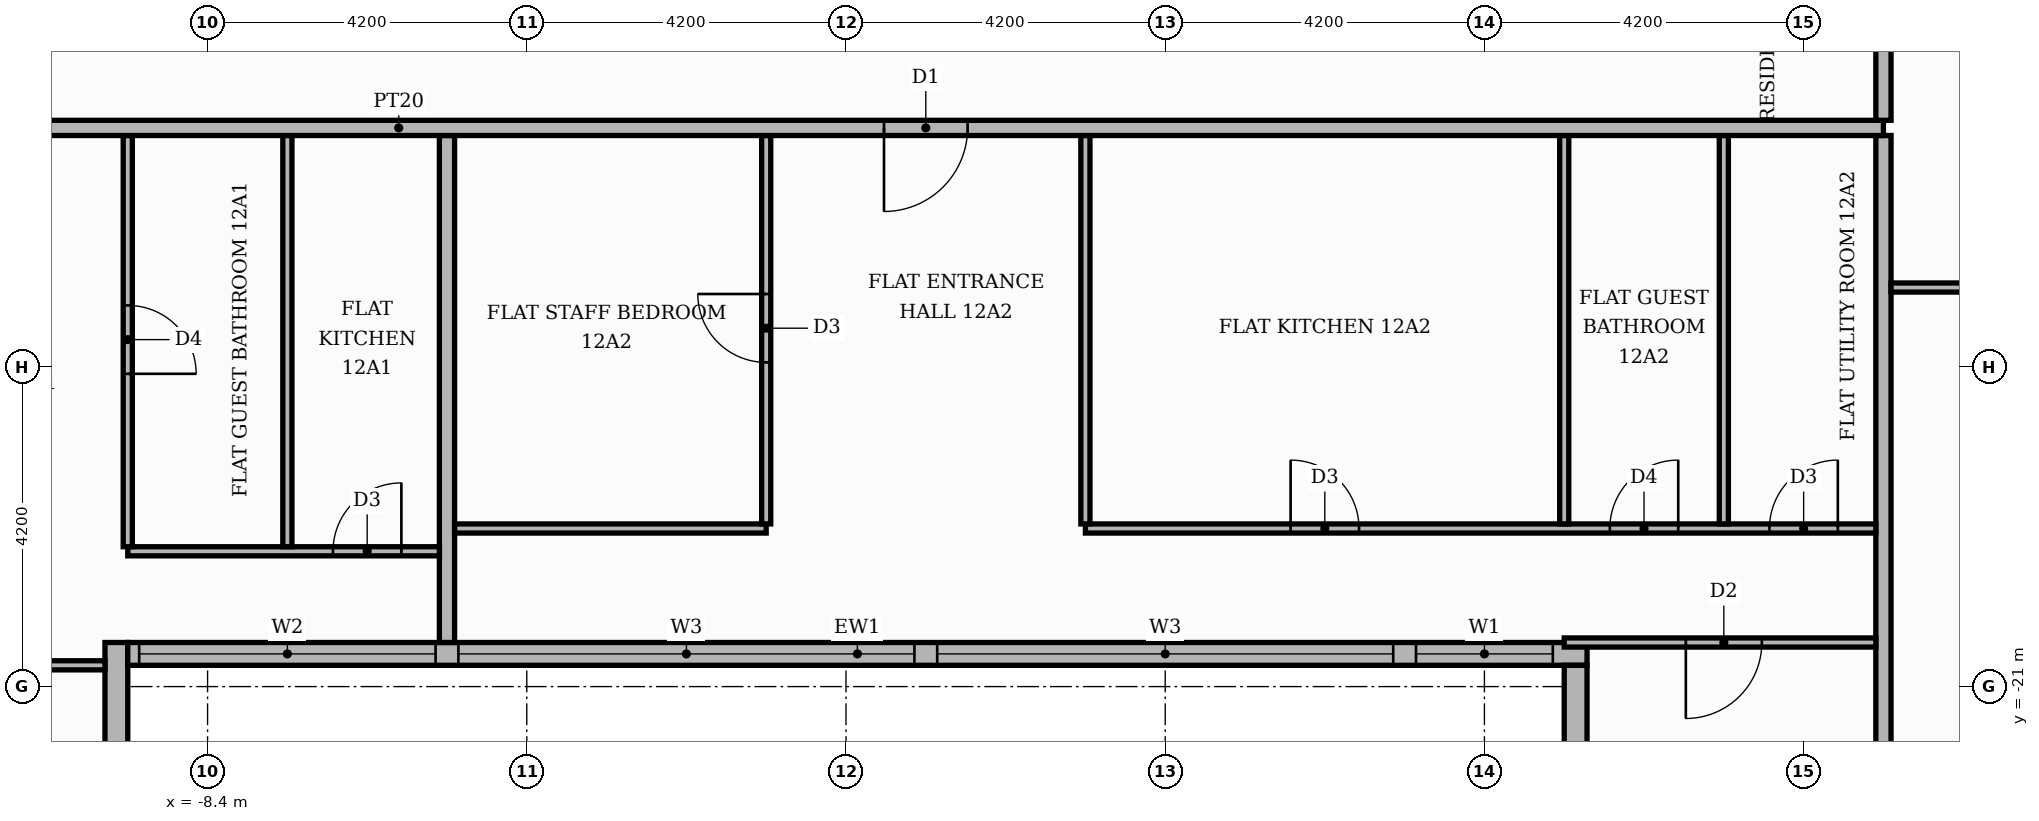
"""IFC4 building model, lengths in metres.
Left out: names, types, materials, properties, quantities, classifications, styles, units other than length and angle.
Written with IfcOpenShell. Run it as: python <this file> out.ifc"""

import sys

from ifc_helpers import new_model, si_unit, direction, frame, frame_2d, origin, place, context, subcontext, project, spatial, rectangle, extrude, element, fill, save


model = new_model("IFC4")
c1 = context("Model", 3, precision=1e-05, world=origin(), true_north=direction((0.0, 1.0)))
c2 = subcontext(c1, "Body", "Model", "MODEL_VIEW")
j1 = project(units=[si_unit("LENGTHUNIT", "METRE"), si_unit("PLANEANGLEUNIT", "RADIAN")], contexts=[c1])
p1 = place(None, origin())
s1 = spatial("IfcSite", under=j1, at=p1, CompositionType="ELEMENT")
p2 = place(p1, origin())
s2 = spatial("IfcBuilding", under=s1, at=p2, CompositionType="ELEMENT")
p3 = place(p2, frame((0.0, 0.0, 54.3)))
s3 = spatial("IfcBuildingStorey", under=s2, at=p3, CompositionType="ELEMENT", Elevation=54.3)
p4 = place(p3, frame((-9.6, -25.42, 0.0), z_axis=(0.0, 0.0, 1.0), x_axis=(0.0, 1.0, 0.0)))
e1 = element("IfcWall", 1, at=p4, inside=s3, PredefinedType="STANDARD", context=c2, shape_type="SweptSolid", body=[
    extrude(rectangle(XDim=5.0, YDim=0.3, at=frame_2d((2.5, 0.0))), origin(), (0.0, 0.0, 1.0), 3.48),
])
p5 = place(p4, frame((1.42, 0.0, 0.9)))
e2 = element("IfcOpeningElement", 2, at=p5, cuts=e1, PredefinedType="OPENING", context=c2, shape_type="SweptSolid", body=[
    extrude(rectangle(XDim=1.8, YDim=2.1, at=frame_2d((0.9, 1.05))), frame((0.0, 0.16, 0.0), z_axis=(0.0, -1.0, 0.0), x_axis=(1.0, 0.0, 0.0)), (0.0, 0.0, 1.0), 0.32),
])
p6 = place(p3, frame((-9.45, -20.57, 0.0), z_axis=(0.0, 0.0, 1.0), x_axis=(1.0, 0.0, 0.0)))
e3 = element("IfcWall", 3, at=p6, inside=s3, PredefinedType="STANDARD", context=c2, shape_type="SweptSolid", body=[
    extrude(rectangle(XDim=19.2, YDim=0.3, at=frame_2d((9.6, 0.0))), origin(), (0.0, 0.0, 1.0), 3.48),
])
p7 = place(p6, frame((0.15, 0.0, 0.9)))
e4 = element("IfcOpeningElement", 4, at=p7, cuts=e3, PredefinedType="OPENING", context=c2, shape_type="SweptSolid", body=[
    extrude(rectangle(XDim=3.9, YDim=2.1, at=frame_2d((1.95, 1.05))), frame((0.0, 0.16, 0.0), z_axis=(0.0, -1.0, 0.0), x_axis=(1.0, 0.0, 0.0)), (0.0, 0.0, 1.0), 0.32),
])
p8 = place(p6, frame((4.35, 0.0, 0.9)))
e5 = element("IfcOpeningElement", 5, at=p8, cuts=e3, PredefinedType="OPENING", context=c2, shape_type="SweptSolid", body=[
    extrude(rectangle(XDim=6.0, YDim=2.1, at=frame_2d((3.0, 1.05))), frame((0.0, 0.16, 0.0), z_axis=(0.0, -1.0, 0.0), x_axis=(1.0, 0.0, 0.0)), (0.0, 0.0, 1.0), 0.32),
])
p9 = place(p6, frame((10.65, 0.0, 0.9)))
e6 = element("IfcOpeningElement", 6, at=p9, cuts=e3, PredefinedType="OPENING", context=c2, shape_type="SweptSolid", body=[
    extrude(rectangle(XDim=6.0, YDim=2.1, at=frame_2d((3.0, 1.05))), frame((0.0, 0.16, 0.0), z_axis=(0.0, -1.0, 0.0), x_axis=(1.0, 0.0, 0.0)), (0.0, 0.0, 1.0), 0.32),
])
p10 = place(p6, frame((16.95, 0.0, 0.9)))
e7 = element("IfcOpeningElement", 7, at=p10, cuts=e3, PredefinedType="OPENING", context=c2, shape_type="SweptSolid", body=[
    extrude(rectangle(XDim=1.8, YDim=2.1, at=frame_2d((0.9, 1.05))), frame((0.0, 0.16, 0.0), z_axis=(0.0, -1.0, 0.0), x_axis=(1.0, 0.0, 0.0)), (0.0, 0.0, 1.0), 0.32),
])
p11 = place(p3, frame((9.6, -20.72, 0.0), z_axis=(0.0, 0.0, 1.0), x_axis=(0.0, -1.0, 0.0)))
e8 = element("IfcWall", 8, at=p11, inside=s3, PredefinedType="STANDARD", context=c2, shape_type="SweptSolid", body=[
    extrude(rectangle(XDim=5.0, YDim=0.3, at=frame_2d((2.5, 0.0))), origin(), (0.0, 0.0, 1.0), 3.48),
])
p12 = place(p11, frame((1.48, 0.0, 0.9)))
e9 = element("IfcOpeningElement", 9, at=p12, cuts=e8, PredefinedType="OPENING", context=c2, shape_type="SweptSolid", body=[
    extrude(rectangle(XDim=1.8, YDim=2.1, at=frame_2d((0.9, 1.05))), frame((0.0, 0.16, 0.0), z_axis=(0.0, -1.0, 0.0), x_axis=(1.0, 0.0, 0.0)), (0.0, 0.0, 1.0), 0.32),
])
p13 = place(p3, frame((13.65, -25.42, 0.0), z_axis=(0.0, 0.0, 1.0), x_axis=(0.0, 1.0, 0.0)))
e10 = element("IfcWall", 10, at=p13, inside=s3, PredefinedType="PARTITIONING", context=c2, shape_type="SweptSolid", body=[
    extrude(rectangle(XDim=11.67, YDim=0.2, at=frame_2d((5.835, 0.0))), origin(), (0.0, 0.0, 1.0), 3.48),
])
p14 = place(p3, frame((-25.42, -20.72, 0.0), z_axis=(0.0, 0.0, 1.0), x_axis=(1.0, 0.0, 0.0)))
e11 = element("IfcWall", 11, at=p14, inside=s3, PredefinedType="PARTITIONING", context=c2, shape_type="SweptSolid", body=[
    extrude(rectangle(XDim=15.67, YDim=0.12, at=frame_2d((7.835, 0.0))), origin(), (0.0, 0.0, 1.0), 3.48),
])
p15 = place(p14, frame((12.32, 0.0, 0.0)))
e12 = element("IfcOpeningElement", 12, at=p15, cuts=e11, PredefinedType="OPENING", context=c2, shape_type="SweptSolid", body=[
    extrude(rectangle(XDim=1.0, YDim=2.1, at=frame_2d((0.5, 1.05))), frame((0.0, 0.07, 0.0), z_axis=(0.0, -1.0, 0.0), x_axis=(1.0, 0.0, 0.0)), (0.0, 0.0, 1.0), 0.14),
])
p16 = place(p3, frame((-5.25, -20.42, 0.0), z_axis=(0.0, 0.0, 1.0), x_axis=(0.0, 1.0, 0.0)))
e13 = element("IfcWall", 13, at=p16, inside=s3, PredefinedType="PARTITIONING", context=c2, shape_type="SweptSolid", body=[
    extrude(rectangle(XDim=6.67, YDim=0.2, at=frame_2d((3.335, 0.0))), origin(), (0.0, 0.0, 1.0), 3.48),
])
p17 = place(p3, frame((9.45, -20.42, 0.0), z_axis=(0.0, 0.0, 1.0), x_axis=(1.0, 0.0, 0.0)))
e14 = element("IfcWall", 14, at=p17, inside=s3, PredefinedType="PARTITIONING", context=c2, shape_type="SweptSolid", body=[
    extrude(rectangle(XDim=4.1, YDim=0.12, at=frame_2d((2.05, 0.0))), origin(), (0.0, 0.0, 1.0), 3.48),
])
p18 = place(p17, frame((1.6, 0.0, 0.0)))
e15 = element("IfcOpeningElement", 15, at=p18, cuts=e14, PredefinedType="OPENING", context=c2, shape_type="SweptSolid", body=[
    extrude(rectangle(XDim=1.0, YDim=2.1, at=frame_2d((0.5, 1.05))), frame((0.0, 0.07, 0.0), z_axis=(0.0, -1.0, 0.0), x_axis=(1.0, 0.0, 0.0)), (0.0, 0.0, 1.0), 0.14),
])
p19 = place(p3, frame((-9.45, -19.22, 0.0), z_axis=(0.0, 0.0, 1.0), x_axis=(1.0, 0.0, 0.0)))
e16 = element("IfcWall", 16, at=p19, inside=s3, PredefinedType="PARTITIONING", context=c2, shape_type="SweptSolid", body=[
    extrude(rectangle(XDim=4.1, YDim=0.12, at=frame_2d((2.05, 0.0))), origin(), (0.0, 0.0, 1.0), 3.48),
])
p20 = place(p19, frame((2.7, 0.0, 0.0)))
e17 = element("IfcOpeningElement", 17, at=p20, cuts=e16, PredefinedType="OPENING", context=c2, shape_type="SweptSolid", body=[
    extrude(rectangle(XDim=0.9, YDim=2.1, at=frame_2d((0.45, 1.05))), frame((0.0, 0.07, 0.0), z_axis=(0.0, -1.0, 0.0), x_axis=(1.0, 0.0, 0.0)), (0.0, 0.0, 1.0), 0.14),
])
p21 = place(p3, frame((-9.45, -19.16, 0.0), z_axis=(0.0, 0.0, 1.0), x_axis=(0.0, 1.0, 0.0)))
e18 = element("IfcWall", 18, at=p21, inside=s3, PredefinedType="PARTITIONING", context=c2, shape_type="SweptSolid", body=[
    extrude(rectangle(XDim=5.41, YDim=0.12, at=frame_2d((2.705, 0.0))), origin(), (0.0, 0.0, 1.0), 3.48),
])
p22 = place(p21, frame((2.275, 0.0, 0.0)))
e19 = element("IfcOpeningElement", 19, at=p22, cuts=e18, PredefinedType="OPENING", context=c2, shape_type="SweptSolid", body=[
    extrude(rectangle(XDim=0.9, YDim=2.1, at=frame_2d((0.45, 1.05))), frame((0.0, 0.07, 0.0), z_axis=(0.0, -1.0, 0.0), x_axis=(1.0, 0.0, 0.0)), (0.0, 0.0, 1.0), 0.14),
])
p23 = place(p3, frame((-7.35, -19.16, 0.0), z_axis=(0.0, 0.0, 1.0), x_axis=(0.0, 1.0, 0.0)))
e20 = element("IfcWall", 20, at=p23, inside=s3, PredefinedType="PARTITIONING", context=c2, shape_type="SweptSolid", body=[
    extrude(rectangle(XDim=5.41, YDim=0.12, at=frame_2d((2.705, 0.0))), origin(), (0.0, 0.0, 1.0), 3.48),
])
p24 = place(p3, frame((-5.15, -18.92, 0.0), z_axis=(0.0, 0.0, 1.0), x_axis=(1.0, 0.0, 0.0)))
e21 = element("IfcWall", 21, at=p24, inside=s3, PredefinedType="PARTITIONING", context=c2, shape_type="SweptSolid", body=[
    extrude(rectangle(XDim=4.1, YDim=0.12, at=frame_2d((2.05, 0.0))), origin(), (0.0, 0.0, 1.0), 3.48),
])
p25 = place(p3, frame((3.15, -18.92, 0.0), z_axis=(0.0, 0.0, 1.0), x_axis=(1.0, 0.0, 0.0)))
e22 = element("IfcWall", 22, at=p25, inside=s3, PredefinedType="PARTITIONING", context=c2, shape_type="SweptSolid", body=[
    extrude(rectangle(XDim=10.4, YDim=0.12, at=frame_2d((5.2, 0.0))), origin(), (0.0, 0.0, 1.0), 3.48),
])
p26 = place(p25, frame((2.7, 0.0, 0.0)))
e23 = element("IfcOpeningElement", 23, at=p26, cuts=e22, PredefinedType="OPENING", context=c2, shape_type="SweptSolid", body=[
    extrude(rectangle(XDim=0.9, YDim=2.1, at=frame_2d((0.45, 1.05))), frame((0.0, 0.07, 0.0), z_axis=(0.0, -1.0, 0.0), x_axis=(1.0, 0.0, 0.0)), (0.0, 0.0, 1.0), 0.14),
])
p27 = place(p25, frame((6.9, 0.0, 0.0)))
e24 = element("IfcOpeningElement", 24, at=p27, cuts=e22, PredefinedType="OPENING", context=c2, shape_type="SweptSolid", body=[
    extrude(rectangle(XDim=0.9, YDim=2.1, at=frame_2d((0.45, 1.05))), frame((0.0, 0.07, 0.0), z_axis=(0.0, -1.0, 0.0), x_axis=(1.0, 0.0, 0.0)), (0.0, 0.0, 1.0), 0.14),
])
p28 = place(p25, frame((9.0, 0.0, 0.0)))
e25 = element("IfcOpeningElement", 25, at=p28, cuts=e22, PredefinedType="OPENING", context=c2, shape_type="SweptSolid", body=[
    extrude(rectangle(XDim=0.9, YDim=2.1, at=frame_2d((0.45, 1.05))), frame((0.0, 0.07, 0.0), z_axis=(0.0, -1.0, 0.0), x_axis=(1.0, 0.0, 0.0)), (0.0, 0.0, 1.0), 0.14),
])
p29 = place(p3, frame((-1.05, -18.86, 0.0), z_axis=(0.0, 0.0, 1.0), x_axis=(0.0, 1.0, 0.0)))
e26 = element("IfcWall", 26, at=p29, inside=s3, PredefinedType="PARTITIONING", context=c2, shape_type="SweptSolid", body=[
    extrude(rectangle(XDim=5.11, YDim=0.12, at=frame_2d((2.555, 0.0))), origin(), (0.0, 0.0, 1.0), 3.48),
])
p30 = place(p29, frame((2.125, 0.0, 0.0)))
e27 = element("IfcOpeningElement", 27, at=p30, cuts=e26, PredefinedType="OPENING", context=c2, shape_type="SweptSolid", body=[
    extrude(rectangle(XDim=0.9, YDim=2.1, at=frame_2d((0.45, 1.05))), frame((0.0, 0.07, 0.0), z_axis=(0.0, -1.0, 0.0), x_axis=(1.0, 0.0, 0.0)), (0.0, 0.0, 1.0), 0.14),
])
for number, where, z_axis, x_axis in (
    (28, (3.15, -18.86, 0.0), (0.0, 0.0, 1.0), (0.0, 1.0, 0.0)),
    (29, (9.45, -18.86, 0.0), (0.0, 0.0, 1.0), (0.0, 1.0, 0.0)),
    (30, (11.55, -18.86, 0.0), (0.0, 0.0, 1.0), (0.0, 1.0, 0.0)),
):
    element("IfcWall", number, at=place(p3, frame(where, z_axis=z_axis, x_axis=x_axis)), inside=s3, PredefinedType="PARTITIONING", context=c2, shape_type="SweptSolid", body=[
        extrude(rectangle(XDim=5.11, YDim=0.12, at=frame_2d((2.555, 0.0))), origin(), (0.0, 0.0, 1.0), 3.48),
    ])
p31 = place(p3, frame((13.75, -15.75, 0.0), z_axis=(0.0, 0.0, 1.0), x_axis=(1.0, 0.0, 0.0)))
e31 = element("IfcWall", 31, at=p31, inside=s3, PredefinedType="PARTITIONING", context=c2, shape_type="SweptSolid", body=[
    extrude(rectangle(XDim=6.67, YDim=0.12, at=frame_2d((3.335, 0.0))), origin(), (0.0, 0.0, 1.0), 3.48),
])
p32 = place(p31, frame((2.785, 0.0, 0.0)))
e32 = element("IfcOpeningElement", 32, at=p32, cuts=e31, PredefinedType="OPENING", context=c2, shape_type="SweptSolid", body=[
    extrude(rectangle(XDim=1.0, YDim=2.1, at=frame_2d((0.5, 1.05))), frame((0.0, 0.07, 0.0), z_axis=(0.0, -1.0, 0.0), x_axis=(1.0, 0.0, 0.0)), (0.0, 0.0, 1.0), 0.14),
])
p33 = place(p3, frame((-25.42, -13.65, 0.0), z_axis=(0.0, 0.0, 1.0), x_axis=(1.0, 0.0, 0.0)))
e33 = element("IfcWall", 33, at=p33, inside=s3, PredefinedType="PARTITIONING", context=c2, shape_type="SweptSolid", body=[
    extrude(rectangle(XDim=39.07, YDim=0.2, at=frame_2d((19.535, 0.0))), origin(), (0.0, 0.0, 1.0), 3.48),
])
p34 = place(p33, frame((13.32, 0.0, 0.0)))
e34 = element("IfcOpeningElement", 34, at=p34, cuts=e33, PredefinedType="OPENING", context=c2, shape_type="SweptSolid", body=[
    extrude(rectangle(XDim=1.1, YDim=2.4, at=frame_2d((0.55, 1.2))), frame((0.0, 0.11, 0.0), z_axis=(0.0, -1.0, 0.0), x_axis=(1.0, 0.0, 0.0)), (0.0, 0.0, 1.0), 0.22),
])
p35 = place(p33, frame((25.92, 0.0, 0.0)))
e35 = element("IfcOpeningElement", 35, at=p35, cuts=e33, PredefinedType="OPENING", context=c2, shape_type="SweptSolid", body=[
    extrude(rectangle(XDim=1.1, YDim=2.4, at=frame_2d((0.55, 1.2))), frame((0.0, 0.11, 0.0), z_axis=(0.0, -1.0, 0.0), x_axis=(1.0, 0.0, 0.0)), (0.0, 0.0, 1.0), 0.22),
])
p36 = place(p3, frame((13.65, -13.55, 0.0), z_axis=(0.0, 0.0, 1.0), x_axis=(0.0, 1.0, 0.0)))
e36 = element("IfcWall", 36, at=p36, inside=s3, PredefinedType="PARTITIONING", context=c2, shape_type="SweptSolid", body=[
    extrude(rectangle(XDim=27.1, YDim=0.2, at=frame_2d((13.55, 0.0))), origin(), (0.0, 0.0, 1.0), 3.48),
])
p37 = place(p36, frame((1.45, 0.0, 0.0)))
e37 = element("IfcOpeningElement", 37, at=p37, cuts=e36, PredefinedType="OPENING", context=c2, shape_type="SweptSolid", body=[
    extrude(rectangle(XDim=1.1, YDim=2.4, at=frame_2d((0.55, 1.2))), frame((0.0, 0.11, 0.0), z_axis=(0.0, -1.0, 0.0), x_axis=(1.0, 0.0, 0.0)), (0.0, 0.0, 1.0), 0.22),
])
p38 = place(p7, origin())
e38 = element("IfcWindow", 38, at=p38, inside=s3, PartitioningType="SINGLE_PANEL", PredefinedType="WINDOW", context=c2, shape_type="SweptSolid", body=[
    extrude(rectangle(XDim=3.9, YDim=2.1, at=frame_2d((1.95, 1.05))), frame((0.0, 0.03, 0.0), z_axis=(0.0, -1.0, 0.0), x_axis=(1.0, 0.0, 0.0)), (0.0, 0.0, 1.0), 0.06),
])
fill(e4, e38)
p39 = place(p8, origin())
e39 = element("IfcWindow", 39, at=p39, inside=s3, PartitioningType="SINGLE_PANEL", PredefinedType="WINDOW", context=c2, shape_type="SweptSolid", body=[
    extrude(rectangle(XDim=6.0, YDim=2.1, at=frame_2d((3.0, 1.05))), frame((0.0, 0.03, 0.0), z_axis=(0.0, -1.0, 0.0), x_axis=(1.0, 0.0, 0.0)), (0.0, 0.0, 1.0), 0.06),
])
fill(e5, e39)
p40 = place(p9, origin())
e40 = element("IfcWindow", 40, at=p40, inside=s3, PartitioningType="SINGLE_PANEL", PredefinedType="WINDOW", context=c2, shape_type="SweptSolid", body=[
    extrude(rectangle(XDim=6.0, YDim=2.1, at=frame_2d((3.0, 1.05))), frame((0.0, 0.03, 0.0), z_axis=(0.0, -1.0, 0.0), x_axis=(1.0, 0.0, 0.0)), (0.0, 0.0, 1.0), 0.06),
])
fill(e6, e40)
p41 = place(p10, origin())
e41 = element("IfcWindow", 41, at=p41, inside=s3, PartitioningType="SINGLE_PANEL", PredefinedType="WINDOW", context=c2, shape_type="SweptSolid", body=[
    extrude(rectangle(XDim=1.8, YDim=2.1, at=frame_2d((0.9, 1.05))), frame((0.0, 0.03, 0.0), z_axis=(0.0, -1.0, 0.0), x_axis=(1.0, 0.0, 0.0)), (0.0, 0.0, 1.0), 0.06),
])
fill(e7, e41)
p42 = place(p22, frame((0.9, 0.0, 0.0), z_axis=(0.0, 0.0, 1.0), x_axis=(-1.0, 0.0, 0.0)))
e42 = element("IfcDoor", 42, at=p42, inside=s3, OperationType="SINGLE_SWING_LEFT", PredefinedType="DOOR", context=c2, shape_type="SweptSolid", body=[
    extrude(rectangle(XDim=0.9, YDim=2.1, at=frame_2d((0.45, 1.05))), frame((0.0, 0.025, 0.0), z_axis=(0.0, -1.0, 0.0), x_axis=(1.0, 0.0, 0.0)), (0.0, 0.0, 1.0), 0.05),
])
fill(e19, e42)
p43 = place(p20, origin())
e43 = element("IfcDoor", 43, at=p43, inside=s3, OperationType="SINGLE_SWING_RIGHT", PredefinedType="DOOR", context=c2, shape_type="SweptSolid", body=[
    extrude(rectangle(XDim=0.9, YDim=2.1, at=frame_2d((0.45, 1.05))), frame((0.0, 0.025, 0.0), z_axis=(0.0, -1.0, 0.0), x_axis=(1.0, 0.0, 0.0)), (0.0, 0.0, 1.0), 0.05),
])
fill(e17, e43)
p44 = place(p35, frame((1.1, 0.0, 0.0), z_axis=(0.0, 0.0, 1.0), x_axis=(-1.0, 0.0, 0.0)))
e44 = element("IfcDoor", 44, at=p44, inside=s3, OperationType="SINGLE_SWING_LEFT", PredefinedType="DOOR", context=c2, shape_type="SweptSolid", body=[
    extrude(rectangle(XDim=1.1, YDim=2.4, at=frame_2d((0.55, 1.2))), frame((0.0, 0.025, 0.0), z_axis=(0.0, -1.0, 0.0), x_axis=(1.0, 0.0, 0.0)), (0.0, 0.0, 1.0), 0.05),
])
fill(e35, e44)
p45 = place(p30, origin())
e45 = element("IfcDoor", 45, at=p45, inside=s3, OperationType="SINGLE_SWING_RIGHT", PredefinedType="DOOR", context=c2, shape_type="SweptSolid", body=[
    extrude(rectangle(XDim=0.9, YDim=2.1, at=frame_2d((0.45, 1.05))), frame((0.0, 0.025, 0.0), z_axis=(0.0, -1.0, 0.0), x_axis=(1.0, 0.0, 0.0)), (0.0, 0.0, 1.0), 0.05),
])
fill(e27, e45)
p46 = place(p26, origin())
e46 = element("IfcDoor", 46, at=p46, inside=s3, OperationType="SINGLE_SWING_LEFT", PredefinedType="DOOR", context=c2, shape_type="SweptSolid", body=[
    extrude(rectangle(XDim=0.9, YDim=2.1, at=frame_2d((0.45, 1.05))), frame((0.0, 0.025, 0.0), z_axis=(0.0, -1.0, 0.0), x_axis=(1.0, 0.0, 0.0)), (0.0, 0.0, 1.0), 0.05),
])
fill(e23, e46)
p47 = place(p27, origin())
e47 = element("IfcDoor", 47, at=p47, inside=s3, OperationType="SINGLE_SWING_RIGHT", PredefinedType="DOOR", context=c2, shape_type="SweptSolid", body=[
    extrude(rectangle(XDim=0.9, YDim=2.1, at=frame_2d((0.45, 1.05))), frame((0.0, 0.025, 0.0), z_axis=(0.0, -1.0, 0.0), x_axis=(1.0, 0.0, 0.0)), (0.0, 0.0, 1.0), 0.05),
])
fill(e24, e47)
p48 = place(p28, origin())
e48 = element("IfcDoor", 48, at=p48, inside=s3, OperationType="SINGLE_SWING_RIGHT", PredefinedType="DOOR", context=c2, shape_type="SweptSolid", body=[
    extrude(rectangle(XDim=0.9, YDim=2.1, at=frame_2d((0.45, 1.05))), frame((0.0, 0.025, 0.0), z_axis=(0.0, -1.0, 0.0), x_axis=(1.0, 0.0, 0.0)), (0.0, 0.0, 1.0), 0.05),
])
fill(e25, e48)
p49 = place(p18, frame((1.0, 0.0, 0.0), z_axis=(0.0, 0.0, 1.0), x_axis=(-1.0, 0.0, 0.0)))
e49 = element("IfcDoor", 49, at=p49, inside=s3, OperationType="SINGLE_SWING_LEFT", PredefinedType="DOOR", context=c2, shape_type="SweptSolid", body=[
    extrude(rectangle(XDim=1.0, YDim=2.1, at=frame_2d((0.5, 1.05))), frame((0.0, 0.025, 0.0), z_axis=(0.0, -1.0, 0.0), x_axis=(1.0, 0.0, 0.0)), (0.0, 0.0, 1.0), 0.05),
])
fill(e15, e49)
save(model, sys.argv[1])
